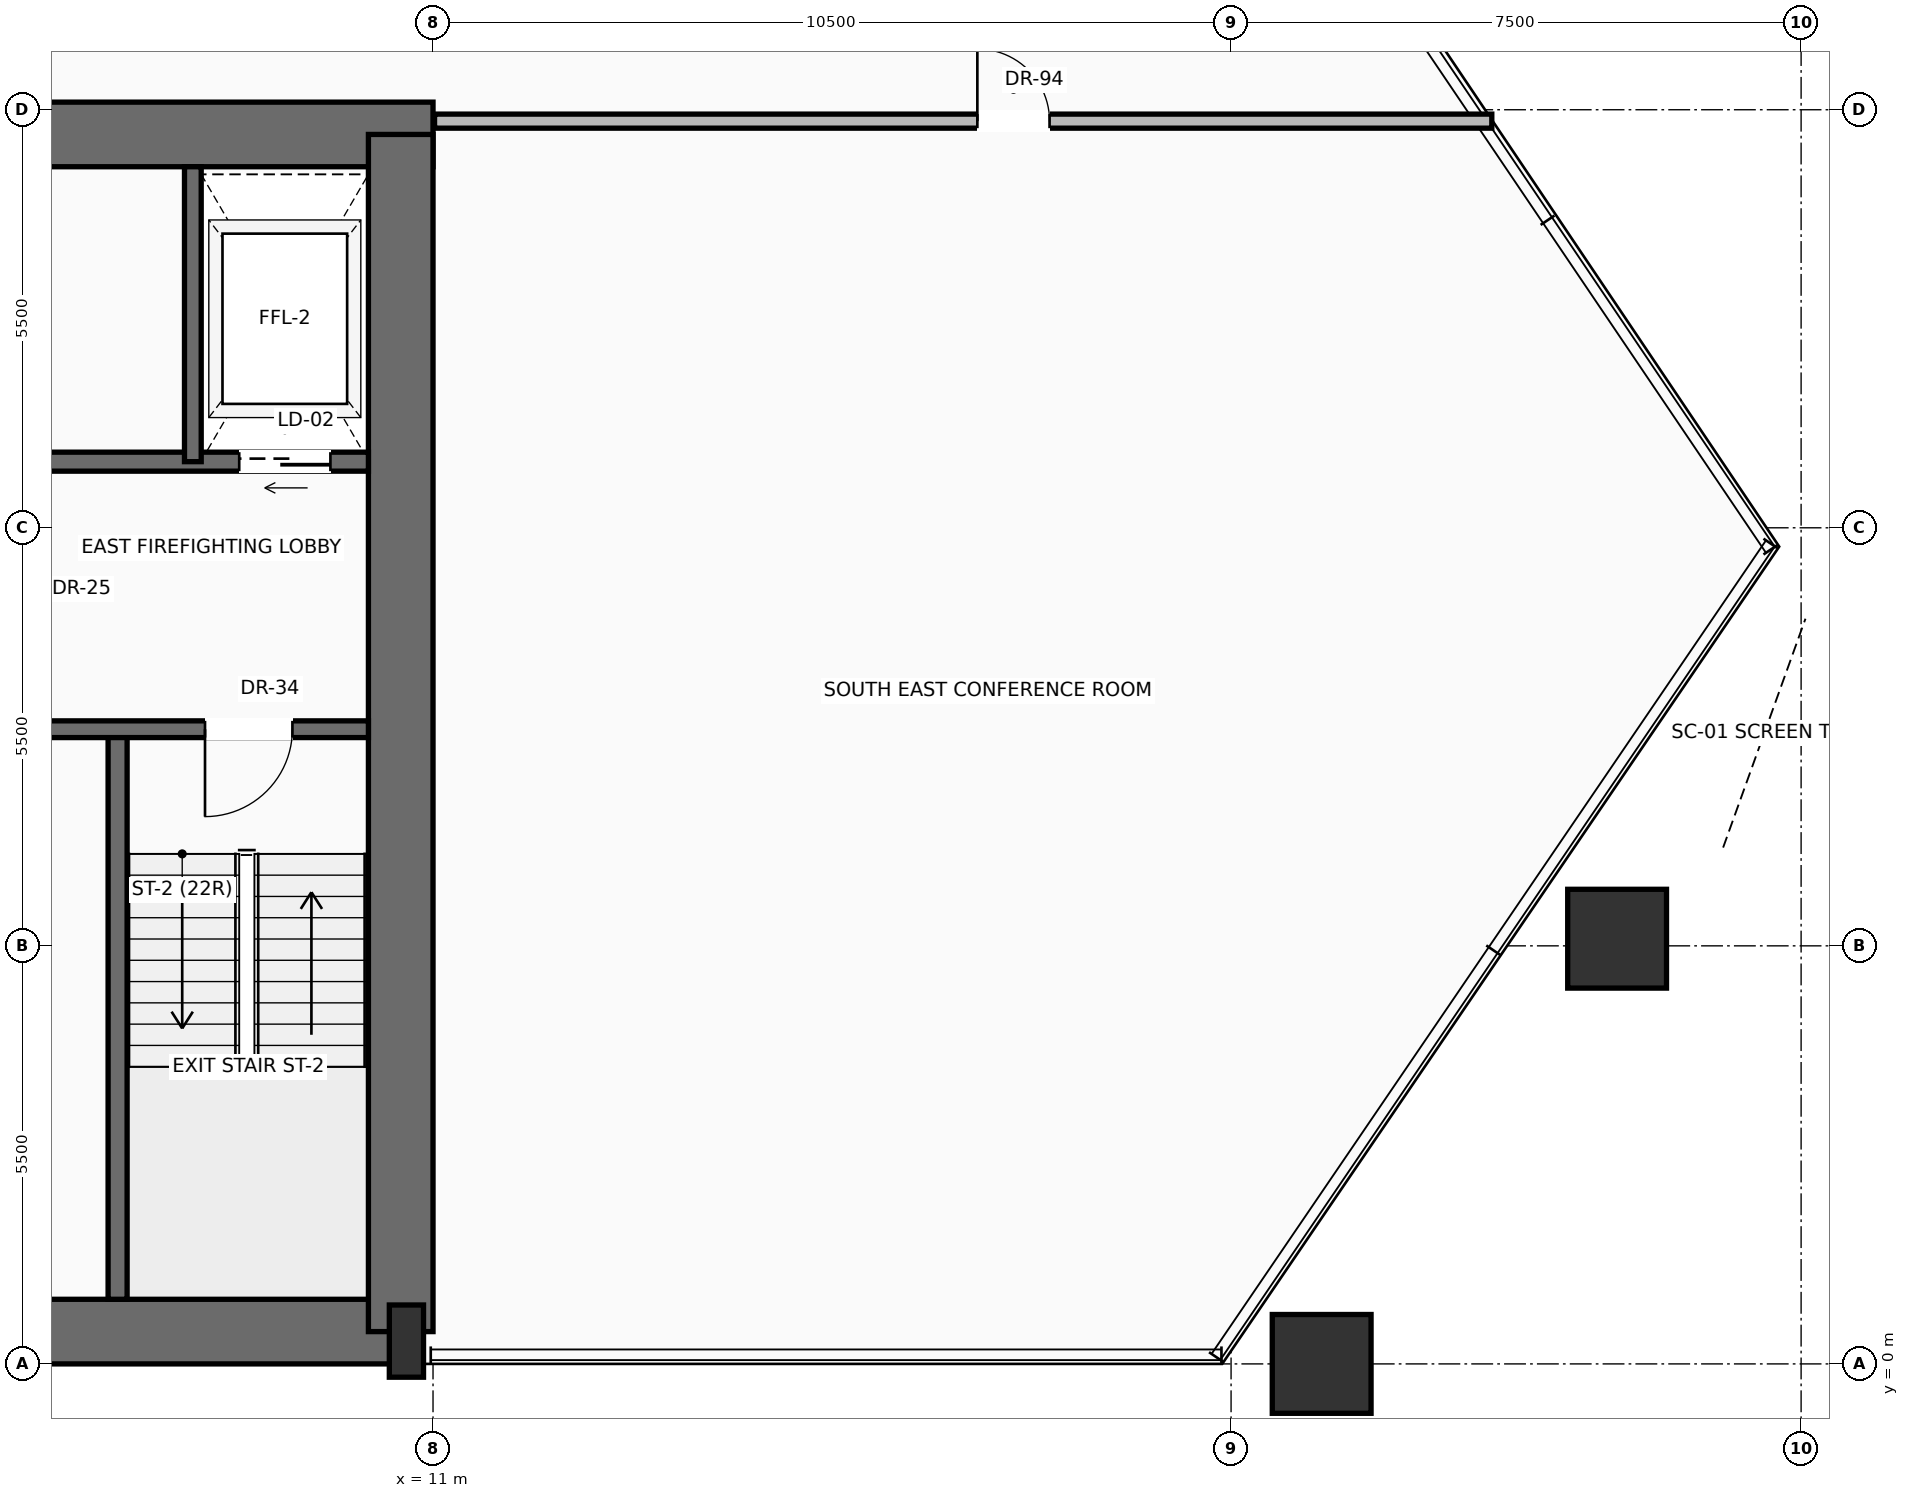
"""IFC4 building model, lengths in metres.
Left out: names, types, materials, properties, quantities, classifications, styles, units other than length and angle.
Written with IfcOpenShell. Run it as: python <this file> out.ifc"""

import sys

from ifc_helpers import new_model, si_unit, direction, frame, frame_2d, origin, origin_2d, place, context, subcontext, project, spatial, rectangle, hollow_rectangle, extrude, source, transform, mapped, element, fill, save


model = new_model("IFC4")
c1 = context("Model", 3, precision=1e-05, world=origin(), true_north=direction((0.0, 1.0)))
c2 = subcontext(c1, "Body", "Model", "MODEL_VIEW")
j1 = project(units=[si_unit("LENGTHUNIT", "METRE"), si_unit("PLANEANGLEUNIT", "RADIAN")], contexts=[c1])
p1 = place(None, origin())
s1 = spatial("IfcSite", under=j1, at=p1, CompositionType="ELEMENT")
p2 = place(p1, origin())
s2 = spatial("IfcBuilding", under=s1, at=p2, CompositionType="ELEMENT")
p3 = place(p2, frame((0.0, 0.0, 42.3)))
s3 = spatial("IfcBuildingStorey", under=s2, at=p3, CompositionType="ELEMENT", Elevation=42.3)
p4 = place(p3, frame((-10.65, 0.425, 0.0), z_axis=(0.0, 0.0, 1.0), x_axis=(1.0, 0.0, 0.0)))
e1 = element("IfcWall", 1, at=p4, inside=s3, PredefinedType="SHEAR", context=c2, shape_type="SweptSolid", body=[
    extrude(rectangle(XDim=21.3, YDim=0.85, at=frame_2d((10.65, 0.0))), origin(), (0.0, 0.0, 1.0), 3.45),
])
p5 = place(p3, frame((-11.0, 16.175, 0.0), z_axis=(0.0, 0.0, 1.0), x_axis=(1.0, 0.0, 0.0)))
e2 = element("IfcWall", 2, at=p5, inside=s3, PredefinedType="SHEAR", context=c2, shape_type="SweptSolid", body=[
    extrude(rectangle(XDim=22.0, YDim=0.85, at=frame_2d((11.0, 0.0))), origin(), (0.0, 0.0, 1.0), 3.45),
])
p6 = place(p5, frame((3.57, 0.0, 0.0)))
e3 = element("IfcOpeningElement", 3, at=p6, cuts=e2, PredefinedType="OPENING", context=c2, shape_type="SweptSolid", body=[
    extrude(rectangle(XDim=1.3, YDim=2.3, at=frame_2d((0.65, 1.15))), frame((0.0, 0.435, 0.0), z_axis=(0.0, -1.0, 0.0), x_axis=(1.0, 0.0, 0.0)), (0.0, 0.0, 1.0), 0.87),
])
p7 = place(p5, frame((10.0, 0.0, 0.0)))
e4 = element("IfcOpeningElement", 4, at=p7, cuts=e2, PredefinedType="OPENING", context=c2, shape_type="SweptSolid", body=[
    extrude(rectangle(XDim=2.0, YDim=2.4, at=frame_2d((1.0, 1.2))), frame((0.0, 0.435, 0.0), z_axis=(0.0, -1.0, 0.0), x_axis=(1.0, 0.0, 0.0)), (0.0, 0.0, 1.0), 0.87),
])
p8 = place(p3, frame((10.575, 0.425, 0.0), z_axis=(0.0, 0.0, 1.0), x_axis=(0.0, 1.0, 0.0)))
e5 = element("IfcWall", 5, at=p8, inside=s3, PredefinedType="SHEAR", context=c2, shape_type="SweptSolid", body=[
    extrude(rectangle(XDim=15.75, YDim=0.85, at=frame_2d((7.875, 0.0))), origin(), (0.0, 0.0, 1.0), 3.45),
])
m1 = source(origin(), c2, "Body", "SweptSolid", [
    extrude(rectangle(XDim=0.45, YDim=0.95, at=origin_2d()), origin(), (0.0, 0.0, 1.0), 3.7),
])
p9 = place(p3, frame((10.65, 0.3, 0.0), z_axis=(0.0, 0.0, 1.0), x_axis=(1.0, 0.0, 0.0)))
e6 = element("IfcColumn", 6, at=p9, inside=s3, PredefinedType="PILASTER", context=c2, shape_type="MappedRepresentation", body=[
    mapped(m1, transform((0.0, 0.0, 0.0), scale=1.0)),
])
m2 = source(origin(), c2, "Body", "SweptSolid", [
    extrude(hollow_rectangle(XDim=1.3, YDim=1.3, WallThickness=0.065, at=origin_2d()), origin(), (0.0, 0.0, 1.0), 3.692),
])
for number, where, z_axis, x_axis in (
    (7, (22.692, 0.0, 0.004), (0.016, 0.0, 1.0), (0.0, 1.0, 0.0)),
    (8, (26.579, 5.594, 0.004), (0.004, -0.017, 1.0), (0.972, 0.234, 0.0)),
):
    element("IfcColumn", number, at=place(p3, frame(where, z_axis=z_axis, x_axis=x_axis)), inside=s3, PredefinedType="COLUMN", context=c2, shape_type="MappedRepresentation", body=[
        mapped(m2, transform((0.0, 0.0, 0.0), scale=1.0)),
    ])
p10 = place(p3, frame((6.85, 0.85, 0.0), z_axis=(0.0, 0.0, 1.0), x_axis=(0.0, 1.0, 0.0)))
e9 = element("IfcWall", 9, at=p10, inside=s3, PredefinedType="SOLIDWALL", context=c2, shape_type="SweptSolid", body=[
    extrude(rectangle(XDim=7.5, YDim=0.25, at=frame_2d((3.75, 0.0))), origin(), (0.0, 0.0, 1.0), 3.45),
])
p11 = place(p3, frame((10.15, 8.35, 0.0), z_axis=(0.0, 0.0, 1.0), x_axis=(-1.0, 0.0, 0.0)))
e10 = element("IfcWall", 10, at=p11, inside=s3, PredefinedType="SOLIDWALL", context=c2, shape_type="SweptSolid", body=[
    extrude(rectangle(XDim=4.65, YDim=0.22, at=frame_2d((2.325, 0.0))), origin(), (0.0, 0.0, 1.0), 3.45),
])
p12 = place(p11, frame((1.0, 0.0, 0.0)))
e11 = element("IfcOpeningElement", 11, at=p12, cuts=e10, PredefinedType="OPENING", context=c2, shape_type="SweptSolid", body=[
    extrude(rectangle(XDim=1.15, YDim=2.2, at=frame_2d((0.575, 1.1))), frame((0.0, 0.12, 0.0), z_axis=(0.0, -1.0, 0.0), x_axis=(1.0, 0.0, 0.0)), (0.0, 0.0, 1.0), 0.24),
])
p13 = place(p3, frame((10.15, 11.87, 0.0), z_axis=(0.0, 0.0, 1.0), x_axis=(-1.0, 0.0, 0.0)))
e12 = element("IfcWall", 12, at=p13, inside=s3, PredefinedType="SOLIDWALL", context=c2, shape_type="SweptSolid", body=[
    extrude(rectangle(XDim=4.65, YDim=0.25, at=frame_2d((2.325, 0.0))), origin(), (0.0, 0.0, 1.0), 3.45),
])
p14 = place(p13, frame((0.5, 0.0, 0.0)))
e13 = element("IfcOpeningElement", 13, at=p14, cuts=e12, PredefinedType="OPENING", context=c2, shape_type="SweptSolid", body=[
    extrude(rectangle(XDim=1.2, YDim=2.25, at=frame_2d((0.6, 1.125))), frame((0.0, 0.135, 0.0), z_axis=(0.0, -1.0, 0.0), x_axis=(1.0, 0.0, 0.0)), (0.0, 0.0, 1.0), 0.27),
])
p15 = place(p3, frame((7.84, 11.87, 0.0), z_axis=(0.0, 0.0, 1.0), x_axis=(0.0, 1.0, 0.0)))
e14 = element("IfcWall", 14, at=p15, inside=s3, PredefinedType="SOLIDWALL", context=c2, shape_type="SweptSolid", body=[
    extrude(rectangle(XDim=3.88, YDim=0.22, at=frame_2d((1.94, 0.0))), origin(), (0.0, 0.0, 1.0), 3.45),
])
p16 = place(p3, frame((11.02, 16.35, 0.0), z_axis=(0.0, 0.0, 1.0), x_axis=(1.0, 0.0, 0.0)))
e15 = element("IfcWall", 15, at=p16, inside=s3, PredefinedType="PARTITIONING", context=c2, shape_type="SweptSolid", body=[
    extrude(rectangle(XDim=13.91, YDim=0.185, at=frame_2d((6.955, 0.0))), origin(), (0.0, 0.0, 1.0), 2.747),
])
p17 = place(p16, frame((7.142, 0.0, 0.0)))
e16 = element("IfcOpeningElement", 16, at=p17, cuts=e15, PredefinedType="OPENING", context=c2, shape_type="SweptSolid", body=[
    extrude(rectangle(XDim=0.95, YDim=2.2, at=frame_2d((0.475, 1.1))), frame((0.0, 0.103, 0.0), z_axis=(0.0, -1.0, 0.0), x_axis=(1.0, 0.0, 0.0)), (0.0, 0.0, 1.0), 0.205),
])
m3 = source(origin(), c2, "Body", "SweptSolid", [
    extrude(rectangle(XDim=1.15, YDim=2.2, at=frame_2d((0.575, 1.1))), frame((0.0, 0.025, 0.0), z_axis=(0.0, -1.0, 0.0), x_axis=(1.0, 0.0, 0.0)), (0.0, 0.0, 1.0), 0.05),
])
p18 = place(p12, origin())
e17 = element("IfcDoor", 17, at=p18, inside=s3, OperationType="SINGLE_SWING_RIGHT", PredefinedType="DOOR", context=c2, shape_type="MappedRepresentation", body=[
    mapped(m3, transform((0.0, 0.0, 0.0), scale=1.0)),
])
fill(e11, e17)
m4 = source(origin(), c2, "Body", "SweptSolid", [
    extrude(rectangle(XDim=1.2, YDim=2.25, at=frame_2d((0.6, 1.125))), frame((0.0, 0.025, 0.0), z_axis=(0.0, -1.0, 0.0), x_axis=(1.0, 0.0, 0.0)), (0.0, 0.0, 1.0), 0.05),
])
p19 = place(p14, origin())
e18 = element("IfcDoor", 18, at=p19, inside=s3, OperationType="SLIDING_TO_RIGHT", PredefinedType="DOOR", context=c2, shape_type="MappedRepresentation", body=[
    mapped(m4, transform((0.0, 0.0, 0.0), scale=1.0)),
])
fill(e13, e18)
m5 = source(origin(), c2, "Body", "SweptSolid", [
    extrude(rectangle(XDim=0.95, YDim=2.2, at=frame_2d((0.475, 1.1))), frame((0.0, 0.025, 0.0), z_axis=(0.0, -1.0, 0.0), x_axis=(1.0, 0.0, 0.0)), (0.0, 0.0, 1.0), 0.05),
])
p20 = place(p17, origin())
e19 = element("IfcDoor", 19, at=p20, inside=s3, OperationType="SINGLE_SWING_LEFT", PredefinedType="DOOR", context=c2, shape_type="MappedRepresentation", body=[
    mapped(m5, transform((0.0, 0.0, 0.0), scale=1.0)),
])
fill(e16, e19)
save(model, sys.argv[1])
